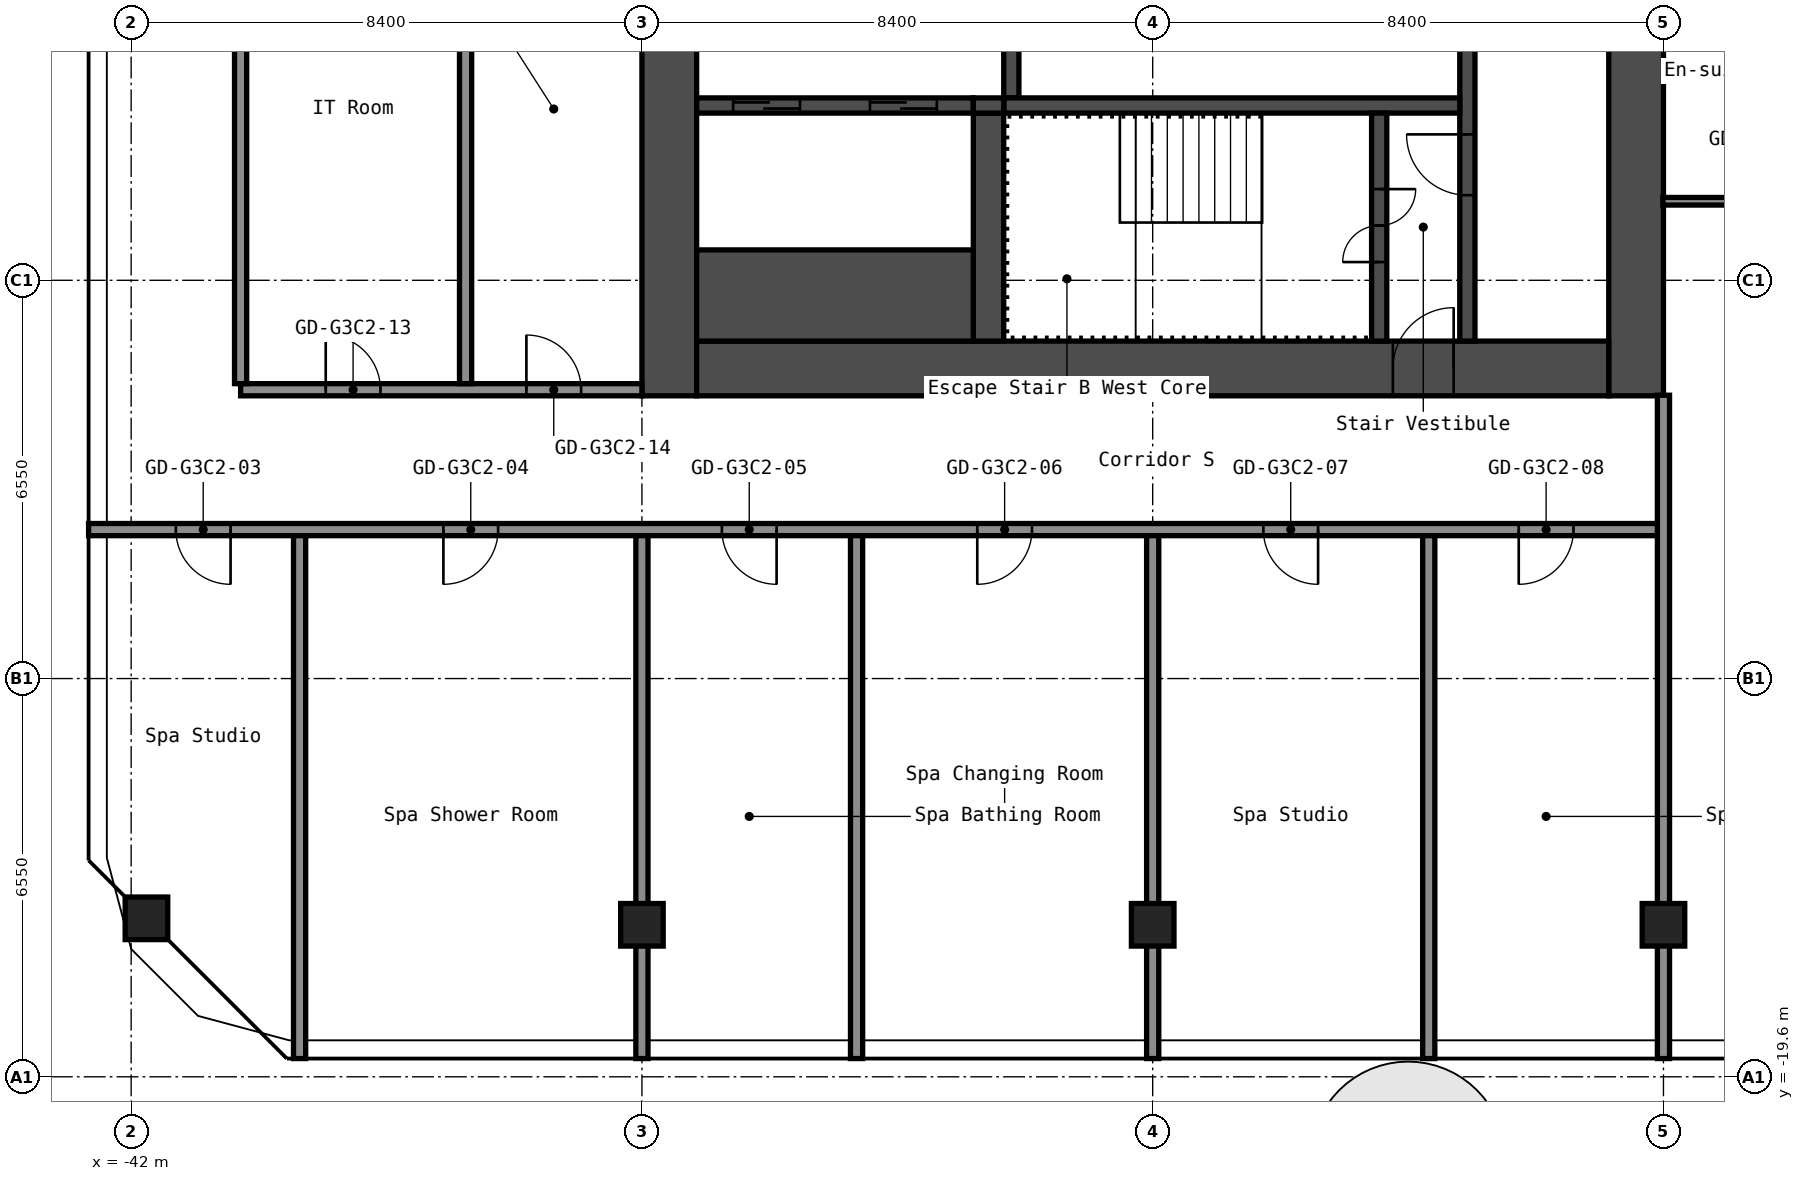
"""IFC4 building model, lengths in metres.
Left out: names, types, materials, properties, quantities, classifications, styles, units other than length and angle.
Written with IfcOpenShell. Run it as: python <this file> out.ifc"""

import sys

from ifc_helpers import new_model, si_unit, direction, frame, frame_2d, origin, origin_2d, place, context, subcontext, project, spatial, rectangle, hollow_rectangle, extrude, element, fill, save


model = new_model("IFC4")
c1 = context("Model", 3, precision=1e-05, world=origin(), true_north=direction((0.0, 1.0)))
c2 = subcontext(c1, "Body", "Model", "MODEL_VIEW")
j1 = project(units=[si_unit("LENGTHUNIT", "METRE"), si_unit("PLANEANGLEUNIT", "RADIAN")], contexts=[c1])
p1 = place(None, origin())
s1 = spatial("IfcSite", under=j1, at=p1, CompositionType="ELEMENT")
p2 = place(p1, origin())
s2 = spatial("IfcBuilding", under=s1, at=p2, CompositionType="ELEMENT")
p3 = place(p2, frame((0.0, 0.0, 169.4)))
s3 = spatial("IfcBuildingStorey", under=s2, at=p3, CompositionType="ELEMENT", Elevation=169.4)
for number, where, z_axis, x_axis in (
    (1, (-41.749, -16.994, 0.0), (0.0, 0.0, 1.0), (1.0, 0.0, 0.0)),
    (2, (-33.6, -17.1, 0.0), (0.0, 0.0, 1.0), (1.0, 0.0, 0.0)),
    (3, (-25.2, -17.1, 0.0), (0.0, 0.0, 1.0), (1.0, 0.0, 0.0)),
    (4, (-16.8, -17.1, 0.0), (0.0, 0.0, 1.0), (1.0, 0.0, 0.0)),
):
    element("IfcColumn", number, at=place(p3, frame(where, z_axis=z_axis, x_axis=x_axis)), inside=s3, PredefinedType="COLUMN", context=c2, shape_type="SweptSolid", body=[
        extrude(hollow_rectangle(XDim=0.7, YDim=0.7, WallThickness=0.028, at=origin_2d()), origin(), (0.0, 0.0, 1.0), 2.75),
    ])
p4 = place(p3, frame((-17.25, -8.4, 0.0), z_axis=(0.0, 0.0, 1.0), x_axis=(0.0, 1.0, 0.0)))
e5 = element("IfcWall", 5, at=p4, inside=s3, PredefinedType="SHEAR", context=c2, shape_type="SweptSolid", body=[
    extrude(rectangle(XDim=16.8, YDim=0.9, at=frame_2d((8.4, 0.0))), origin(), (0.0, 0.0, 1.0), 2.75),
])
p5 = place(p4, frame((7.1, 0.0, 0.0)))
e6 = element("IfcOpeningElement", 6, at=p5, cuts=e5, PredefinedType="OPENING", context=c2, shape_type="SweptSolid", body=[
    extrude(rectangle(XDim=1.6, YDim=2.1, at=frame_2d((0.8, 1.05))), frame((0.0, 0.46, 0.0), z_axis=(0.0, -1.0, 0.0), x_axis=(1.0, 0.0, 0.0)), (0.0, 0.0, 1.0), 0.92),
])
p6 = place(p3, frame((-33.15, -8.4, 0.0), z_axis=(0.0, 0.0, 1.0), x_axis=(0.0, 1.0, 0.0)))
e7 = element("IfcWall", 7, at=p6, inside=s3, PredefinedType="SHEAR", context=c2, shape_type="SweptSolid", body=[
    extrude(rectangle(XDim=16.8, YDim=0.9, at=frame_2d((8.4, 0.0))), origin(), (0.0, 0.0, 1.0), 2.75),
])
p7 = place(p3, frame((-32.7, -7.95, 0.0), z_axis=(0.0, 0.0, 1.0), x_axis=(1.0, 0.0, 0.0)))
e8 = element("IfcWall", 8, at=p7, inside=s3, PredefinedType="SHEAR", context=c2, shape_type="SweptSolid", body=[
    extrude(rectangle(XDim=15.0, YDim=0.9, at=frame_2d((7.5, 0.0))), origin(), (0.0, 0.0, 1.0), 2.75),
])
p8 = place(p7, frame((11.45, 0.0, 0.0)))
e9 = element("IfcOpeningElement", 9, at=p8, cuts=e8, PredefinedType="OPENING", context=c2, shape_type="SweptSolid", body=[
    extrude(rectangle(XDim=1.0, YDim=2.1, at=frame_2d((0.5, 1.05))), frame((0.0, 0.46, 0.0), z_axis=(0.0, -1.0, 0.0), x_axis=(1.0, 0.0, 0.0)), (0.0, 0.0, 1.0), 0.92),
])
p9 = place(p3, frame((-20.025, -7.5, 0.0), z_axis=(0.0, 0.0, 1.0), x_axis=(0.0, 1.0, 0.0)))
e10 = element("IfcWall", 10, at=p9, inside=s3, PredefinedType="SHEAR", context=c2, shape_type="SweptSolid", body=[
    extrude(rectangle(XDim=6.3, YDim=0.25, at=frame_2d((3.15, 0.0))), origin(), (0.0, 0.0, 1.0), 2.75),
])
p10 = place(p9, frame((2.4, 0.0, 0.0)))
e11 = element("IfcOpeningElement", 11, at=p10, cuts=e10, PredefinedType="OPENING", context=c2, shape_type="SweptSolid", body=[
    extrude(rectangle(XDim=1.0, YDim=2.1, at=frame_2d((0.5, 1.05))), frame((0.0, 0.135, 0.0), z_axis=(0.0, -1.0, 0.0), x_axis=(1.0, 0.0, 0.0)), (0.0, 0.0, 1.0), 0.27),
])
p11 = place(p3, frame((-27.525, -3.5, 0.0), z_axis=(0.0, 0.0, 1.0), x_axis=(0.0, 1.0, 0.0)))
e12 = element("IfcWall", 12, at=p11, inside=s3, PredefinedType="SHEAR", context=c2, shape_type="SweptSolid", body=[
    extrude(rectangle(XDim=2.05, YDim=0.25, at=frame_2d((1.025, 0.0))), origin(), (0.0, 0.0, 1.0), 2.75),
])
p12 = place(p3, frame((-27.65, -3.625, 0.0), z_axis=(0.0, 0.0, 1.0), x_axis=(1.0, 0.0, 0.0)))
e13 = element("IfcWall", 13, at=p12, inside=s3, PredefinedType="SHEAR", context=c2, shape_type="SweptSolid", body=[
    extrude(rectangle(XDim=7.5, YDim=0.25, at=frame_2d((3.75, 0.0))), origin(), (0.0, 0.0, 1.0), 2.75),
])
p13 = place(p3, frame((-21.475, -7.5, 0.0), z_axis=(0.0, 0.0, 1.0), x_axis=(0.0, 1.0, 0.0)))
e14 = element("IfcWall", 14, at=p13, inside=s3, PredefinedType="SHEAR", context=c2, shape_type="SweptSolid", body=[
    extrude(rectangle(XDim=3.75, YDim=0.25, at=frame_2d((1.875, 0.0))), origin(), (0.0, 0.0, 1.0), 2.75),
])
p14 = place(p13, frame((1.3, 0.0, 0.0)))
e15 = element("IfcOpeningElement", 15, at=p14, cuts=e14, PredefinedType="OPENING", context=c2, shape_type="SweptSolid", body=[
    extrude(rectangle(XDim=1.2, YDim=2.1, at=frame_2d((0.6, 1.05))), frame((0.0, 0.135, 0.0), z_axis=(0.0, -1.0, 0.0), x_axis=(1.0, 0.0, 0.0)), (0.0, 0.0, 1.0), 0.27),
])
p15 = place(p3, frame((-27.9, -7.5, 0.0), z_axis=(0.0, 0.0, 1.0), x_axis=(0.0, 1.0, 0.0)))
e16 = element("IfcWall", 16, at=p15, inside=s3, PredefinedType="SHEAR", context=c2, shape_type="SweptSolid", body=[
    extrude(rectangle(XDim=3.75, YDim=0.5, at=frame_2d((1.875, 0.0))), origin(), (0.0, 0.0, 1.0), 2.75),
])
p16 = place(p3, frame((-32.7, -3.625, 0.0), z_axis=(0.0, 0.0, 1.0), x_axis=(1.0, 0.0, 0.0)))
e17 = element("IfcWall", 17, at=p16, inside=s3, PredefinedType="SHEAR", context=c2, shape_type="SweptSolid", body=[
    extrude(rectangle(XDim=4.55, YDim=0.25, at=frame_2d((2.275, 0.0))), origin(), (0.0, 0.0, 1.0), 2.75),
])
p17 = place(p16, frame((2.85, 0.0, 0.0)))
e18 = element("IfcOpeningElement", 18, at=p17, cuts=e17, PredefinedType="OPENING", context=c2, shape_type="SweptSolid", body=[
    extrude(rectangle(XDim=1.1, YDim=2.1, at=frame_2d((0.55, 1.05))), frame((0.0, 0.135, 0.0), z_axis=(0.0, -1.0, 0.0), x_axis=(1.0, 0.0, 0.0)), (0.0, 0.0, 1.0), 0.27),
])
p18 = place(p16, frame((0.6, 0.0, 0.0)))
e19 = element("IfcOpeningElement", 19, at=p18, cuts=e17, PredefinedType="OPENING", context=c2, shape_type="SweptSolid", body=[
    extrude(rectangle(XDim=1.1, YDim=2.1, at=frame_2d((0.55, 1.05))), frame((0.0, 0.135, 0.0), z_axis=(0.0, -1.0, 0.0), x_axis=(1.0, 0.0, 0.0)), (0.0, 0.0, 1.0), 0.27),
])
p19 = place(p3, frame((-32.7, -6.75, 0.0), z_axis=(0.0, 0.0, 1.0), x_axis=(1.0, 0.0, 0.0)))
e20 = element("IfcWall", 20, at=p19, inside=s3, PredefinedType="SHEAR", context=c2, shape_type="SweptSolid", body=[
    extrude(rectangle(XDim=4.55, YDim=1.5, at=frame_2d((2.275, 0.0))), origin(), (0.0, 0.0, 1.0), 2.75),
])
p20 = place(p3, frame((-28.15, -3.625, 0.0), z_axis=(0.0, 0.0, 1.0), x_axis=(1.0, 0.0, 0.0)))
e21 = element("IfcWall", 21, at=p20, inside=s3, PredefinedType="SHEAR", context=c2, shape_type="SweptSolid", body=[
    extrude(rectangle(XDim=0.5, YDim=0.25, at=frame_2d((0.25, 0.0))), origin(), (0.0, 0.0, 1.0), 2.75),
])
p21 = place(p3, frame((-42.7, -10.6, 0.0), z_axis=(0.0, 0.0, 1.0), x_axis=(1.0, 0.0, 0.0)))
e22 = element("IfcWall", 22, at=p21, inside=s3, PredefinedType="PARTITIONING", context=c2, shape_type="SweptSolid", body=[
    extrude(rectangle(XDim=25.9, YDim=0.2, at=frame_2d((12.95, 0.0))), origin(), (0.0, 0.0, 1.0), 2.75),
])
p22 = place(p21, frame((1.435, 0.0, 0.0)))
e23 = element("IfcOpeningElement", 23, at=p22, cuts=e22, PredefinedType="OPENING", context=c2, shape_type="SweptSolid", body=[
    extrude(rectangle(XDim=0.9, YDim=2.1, at=frame_2d((0.45, 1.05))), frame((0.0, 0.11, 0.0), z_axis=(0.0, -1.0, 0.0), x_axis=(1.0, 0.0, 0.0)), (0.0, 0.0, 1.0), 0.22),
])
p23 = place(p21, frame((5.835, 0.0, 0.0)))
e24 = element("IfcOpeningElement", 24, at=p23, cuts=e22, PredefinedType="OPENING", context=c2, shape_type="SweptSolid", body=[
    extrude(rectangle(XDim=0.9, YDim=2.1, at=frame_2d((0.45, 1.05))), frame((0.0, 0.11, 0.0), z_axis=(0.0, -1.0, 0.0), x_axis=(1.0, 0.0, 0.0)), (0.0, 0.0, 1.0), 0.22),
])
p24 = place(p21, frame((10.415, 0.0, 0.0)))
e25 = element("IfcOpeningElement", 25, at=p24, cuts=e22, PredefinedType="OPENING", context=c2, shape_type="SweptSolid", body=[
    extrude(rectangle(XDim=0.9, YDim=2.1, at=frame_2d((0.45, 1.05))), frame((0.0, 0.11, 0.0), z_axis=(0.0, -1.0, 0.0), x_axis=(1.0, 0.0, 0.0)), (0.0, 0.0, 1.0), 0.22),
])
p25 = place(p21, frame((14.615, 0.0, 0.0)))
e26 = element("IfcOpeningElement", 26, at=p25, cuts=e22, PredefinedType="OPENING", context=c2, shape_type="SweptSolid", body=[
    extrude(rectangle(XDim=0.9, YDim=2.1, at=frame_2d((0.45, 1.05))), frame((0.0, 0.11, 0.0), z_axis=(0.0, -1.0, 0.0), x_axis=(1.0, 0.0, 0.0)), (0.0, 0.0, 1.0), 0.22),
])
p26 = place(p21, frame((19.32, 0.0, 0.0)))
e27 = element("IfcOpeningElement", 27, at=p26, cuts=e22, PredefinedType="OPENING", context=c2, shape_type="SweptSolid", body=[
    extrude(rectangle(XDim=0.9, YDim=2.1, at=frame_2d((0.45, 1.05))), frame((0.0, 0.11, 0.0), z_axis=(0.0, -1.0, 0.0), x_axis=(1.0, 0.0, 0.0)), (0.0, 0.0, 1.0), 0.22),
])
p27 = place(p21, frame((23.52, 0.0, 0.0)))
e28 = element("IfcOpeningElement", 28, at=p27, cuts=e22, PredefinedType="OPENING", context=c2, shape_type="SweptSolid", body=[
    extrude(rectangle(XDim=0.9, YDim=2.1, at=frame_2d((0.45, 1.05))), frame((0.0, 0.11, 0.0), z_axis=(0.0, -1.0, 0.0), x_axis=(1.0, 0.0, 0.0)), (0.0, 0.0, 1.0), 0.22),
])
p28 = place(p3, frame((-40.2, -8.3, 0.0), z_axis=(0.0, 0.0, 1.0), x_axis=(1.0, 0.0, 0.0)))
e29 = element("IfcWall", 29, at=p28, inside=s3, PredefinedType="PARTITIONING", context=c2, shape_type="SweptSolid", body=[
    extrude(rectangle(XDim=6.6, YDim=0.2, at=frame_2d((3.3, 0.0))), origin(), (0.0, 0.0, 1.0), 2.75),
])
p29 = place(p28, frame((1.4, 0.0, 0.0)))
e30 = element("IfcOpeningElement", 30, at=p29, cuts=e29, PredefinedType="OPENING", context=c2, shape_type="SweptSolid", body=[
    extrude(rectangle(XDim=0.9, YDim=2.1, at=frame_2d((0.45, 1.05))), frame((0.0, 0.11, 0.0), z_axis=(0.0, -1.0, 0.0), x_axis=(1.0, 0.0, 0.0)), (0.0, 0.0, 1.0), 0.22),
])
p30 = place(p28, frame((4.7, 0.0, 0.0)))
e31 = element("IfcOpeningElement", 31, at=p30, cuts=e29, PredefinedType="OPENING", context=c2, shape_type="SweptSolid", body=[
    extrude(rectangle(XDim=0.9, YDim=2.1, at=frame_2d((0.45, 1.05))), frame((0.0, 0.11, 0.0), z_axis=(0.0, -1.0, 0.0), x_axis=(1.0, 0.0, 0.0)), (0.0, 0.0, 1.0), 0.22),
])
p31 = place(p3, frame((-16.81, -5.2, 0.0), z_axis=(0.0, 0.0, 1.0), x_axis=(1.0, 0.0, 0.0)))
e32 = element("IfcWall", 32, at=p31, inside=s3, PredefinedType="PARTITIONING", context=c2, shape_type="SweptSolid", body=[
    extrude(rectangle(XDim=3.348, YDim=0.125, at=frame_2d((1.674, 0.0))), origin(), (0.0, 0.0, 1.0), 2.75),
])
p32 = place(p31, frame((1.31, 0.0, 0.0)))
e33 = element("IfcOpeningElement", 33, at=p32, cuts=e32, PredefinedType="OPENING", context=c2, shape_type="SweptSolid", body=[
    extrude(rectangle(XDim=0.8, YDim=2.1, at=frame_2d((0.4, 1.05))), frame((0.0, 0.073, 0.0), z_axis=(0.0, -1.0, 0.0), x_axis=(1.0, 0.0, 0.0)), (0.0, 0.0, 1.0), 0.145),
])
p33 = place(p3, frame((-40.2, -8.2, 0.0), z_axis=(0.0, 0.0, 1.0), x_axis=(0.0, 1.0, 0.0)))
e34 = element("IfcWall", 34, at=p33, inside=s3, PredefinedType="PARTITIONING", context=c2, shape_type="SweptSolid", body=[
    extrude(rectangle(XDim=16.4, YDim=0.2, at=frame_2d((8.2, 0.0))), origin(), (0.0, 0.0, 1.0), 2.75),
])
p34 = place(p3, frame((-39.23, -19.3, 0.0), z_axis=(0.0, 0.0, 1.0), x_axis=(0.0, 1.0, 0.0)))
e35 = element("IfcWall", 35, at=p34, inside=s3, PredefinedType="PARTITIONING", context=c2, shape_type="SweptSolid", body=[
    extrude(rectangle(XDim=8.6, YDim=0.2, at=frame_2d((4.3, 0.0))), origin(), (0.0, 0.0, 1.0), 2.75),
])
p35 = place(p3, frame((-36.5, -8.2, 0.0), z_axis=(0.0, 0.0, 1.0), x_axis=(0.0, 1.0, 0.0)))
e36 = element("IfcWall", 36, at=p35, inside=s3, PredefinedType="PARTITIONING", context=c2, shape_type="SweptSolid", body=[
    extrude(rectangle(XDim=8.2, YDim=0.2, at=frame_2d((4.1, 0.0))), origin(), (0.0, 0.0, 1.0), 2.75),
])
for number, where, z_axis, x_axis in (
    (37, (-33.6, -19.3, 0.0), (0.0, 0.0, 1.0), (0.0, 1.0, 0.0)),
    (38, (-30.07, -19.3, 0.0), (0.0, 0.0, 1.0), (0.0, 1.0, 0.0)),
    (39, (-25.2, -19.3, 0.0), (0.0, 0.0, 1.0), (0.0, 1.0, 0.0)),
    (40, (-20.66, -19.3, 0.0), (0.0, 0.0, 1.0), (0.0, 1.0, 0.0)),
):
    element("IfcWall", number, at=place(p3, frame(where, z_axis=z_axis, x_axis=x_axis)), inside=s3, PredefinedType="PARTITIONING", context=c2, shape_type="SweptSolid", body=[
        extrude(rectangle(XDim=8.6, YDim=0.2, at=frame_2d((4.3, 0.0))), origin(), (0.0, 0.0, 1.0), 2.75),
    ])
p36 = place(p3, frame((-16.8, -19.3, 0.0), z_axis=(0.0, 0.0, 1.0), x_axis=(0.0, 1.0, 0.0)))
e41 = element("IfcWall", 41, at=p36, inside=s3, PredefinedType="PARTITIONING", context=c2, shape_type="SweptSolid", body=[
    extrude(rectangle(XDim=10.91, YDim=0.2, at=frame_2d((5.455, 0.0))), origin(), (0.0, 0.0, 1.0), 2.75),
])
p37 = place(p8, origin())
e42 = element("IfcDoor", 42, at=p37, inside=s3, OperationType="SINGLE_SWING_LEFT", PredefinedType="DOOR", context=c2, shape_type="SweptSolid", body=[
    extrude(rectangle(XDim=1.0, YDim=2.1, at=frame_2d((0.5, 1.05))), frame((0.0, 0.025, 0.0), z_axis=(0.0, -1.0, 0.0), x_axis=(1.0, 0.0, 0.0)), (0.0, 0.0, 1.0), 0.05),
])
fill(e9, e42)
p38 = place(p14, origin())
e43 = element("IfcDoor", 43, at=p38, inside=s3, OperationType="DOUBLE_DOOR_SINGLE_SWING", PredefinedType="DOOR", context=c2, shape_type="SweptSolid", body=[
    extrude(rectangle(XDim=1.2, YDim=2.1, at=frame_2d((0.6, 1.05))), frame((0.0, 0.025, 0.0), z_axis=(0.0, -1.0, 0.0), x_axis=(1.0, 0.0, 0.0)), (0.0, 0.0, 1.0), 0.05),
])
fill(e15, e43)
p39 = place(p10, origin())
e44 = element("IfcDoor", 44, at=p39, inside=s3, OperationType="SINGLE_SWING_LEFT", PredefinedType="DOOR", context=c2, shape_type="SweptSolid", body=[
    extrude(rectangle(XDim=1.0, YDim=2.1, at=frame_2d((0.5, 1.05))), frame((0.0, 0.025, 0.0), z_axis=(0.0, -1.0, 0.0), x_axis=(1.0, 0.0, 0.0)), (0.0, 0.0, 1.0), 0.05),
])
fill(e11, e44)
p40 = place(p17, origin())
e45 = element("IfcDoor", 45, at=p40, inside=s3, OperationType="DOUBLE_DOOR_SLIDING", PredefinedType="DOOR", context=c2, shape_type="SweptSolid", body=[
    extrude(rectangle(XDim=1.1, YDim=2.1, at=frame_2d((0.55, 1.05))), frame((0.0, 0.025, 0.0), z_axis=(0.0, -1.0, 0.0), x_axis=(1.0, 0.0, 0.0)), (0.0, 0.0, 1.0), 0.05),
])
fill(e18, e45)
p41 = place(p18, origin())
e46 = element("IfcDoor", 46, at=p41, inside=s3, OperationType="DOUBLE_DOOR_SLIDING", PredefinedType="DOOR", context=c2, shape_type="SweptSolid", body=[
    extrude(rectangle(XDim=1.1, YDim=2.1, at=frame_2d((0.55, 1.05))), frame((0.0, 0.025, 0.0), z_axis=(0.0, -1.0, 0.0), x_axis=(1.0, 0.0, 0.0)), (0.0, 0.0, 1.0), 0.05),
])
fill(e19, e46)
p42 = place(p22, origin())
e47 = element("IfcDoor", 47, at=p42, inside=s3, OperationType="SINGLE_SWING_RIGHT", PredefinedType="DOOR", context=c2, shape_type="SweptSolid", body=[
    extrude(rectangle(XDim=0.9, YDim=2.1, at=frame_2d((0.45, 1.05))), frame((0.0, 0.025, 0.0), z_axis=(0.0, -1.0, 0.0), x_axis=(1.0, 0.0, 0.0)), (0.0, 0.0, 1.0), 0.05),
])
fill(e23, e47)
p43 = place(p23, origin())
e48 = element("IfcDoor", 48, at=p43, inside=s3, OperationType="SINGLE_SWING_LEFT", PredefinedType="DOOR", context=c2, shape_type="SweptSolid", body=[
    extrude(rectangle(XDim=0.9, YDim=2.1, at=frame_2d((0.45, 1.05))), frame((0.0, 0.025, 0.0), z_axis=(0.0, -1.0, 0.0), x_axis=(1.0, 0.0, 0.0)), (0.0, 0.0, 1.0), 0.05),
])
fill(e24, e48)
p44 = place(p24, origin())
e49 = element("IfcDoor", 49, at=p44, inside=s3, OperationType="SINGLE_SWING_RIGHT", PredefinedType="DOOR", context=c2, shape_type="SweptSolid", body=[
    extrude(rectangle(XDim=0.9, YDim=2.1, at=frame_2d((0.45, 1.05))), frame((0.0, 0.025, 0.0), z_axis=(0.0, -1.0, 0.0), x_axis=(1.0, 0.0, 0.0)), (0.0, 0.0, 1.0), 0.05),
])
fill(e25, e49)
p45 = place(p25, origin())
e50 = element("IfcDoor", 50, at=p45, inside=s3, OperationType="SINGLE_SWING_LEFT", PredefinedType="DOOR", context=c2, shape_type="SweptSolid", body=[
    extrude(rectangle(XDim=0.9, YDim=2.1, at=frame_2d((0.45, 1.05))), frame((0.0, 0.025, 0.0), z_axis=(0.0, -1.0, 0.0), x_axis=(1.0, 0.0, 0.0)), (0.0, 0.0, 1.0), 0.05),
])
fill(e26, e50)
p46 = place(p26, origin())
e51 = element("IfcDoor", 51, at=p46, inside=s3, OperationType="SINGLE_SWING_RIGHT", PredefinedType="DOOR", context=c2, shape_type="SweptSolid", body=[
    extrude(rectangle(XDim=0.9, YDim=2.1, at=frame_2d((0.45, 1.05))), frame((0.0, 0.025, 0.0), z_axis=(0.0, -1.0, 0.0), x_axis=(1.0, 0.0, 0.0)), (0.0, 0.0, 1.0), 0.05),
])
fill(e27, e51)
p47 = place(p27, origin())
e52 = element("IfcDoor", 52, at=p47, inside=s3, OperationType="SINGLE_SWING_LEFT", PredefinedType="DOOR", context=c2, shape_type="SweptSolid", body=[
    extrude(rectangle(XDim=0.9, YDim=2.1, at=frame_2d((0.45, 1.05))), frame((0.0, 0.025, 0.0), z_axis=(0.0, -1.0, 0.0), x_axis=(1.0, 0.0, 0.0)), (0.0, 0.0, 1.0), 0.05),
])
fill(e28, e52)
p48 = place(p29, origin())
e53 = element("IfcDoor", 53, at=p48, inside=s3, OperationType="SINGLE_SWING_RIGHT", PredefinedType="DOOR", context=c2, shape_type="SweptSolid", body=[
    extrude(rectangle(XDim=0.9, YDim=2.1, at=frame_2d((0.45, 1.05))), frame((0.0, 0.025, 0.0), z_axis=(0.0, -1.0, 0.0), x_axis=(1.0, 0.0, 0.0)), (0.0, 0.0, 1.0), 0.05),
])
fill(e30, e53)
p49 = place(p30, origin())
e54 = element("IfcDoor", 54, at=p49, inside=s3, OperationType="SINGLE_SWING_RIGHT", PredefinedType="DOOR", context=c2, shape_type="SweptSolid", body=[
    extrude(rectangle(XDim=0.9, YDim=2.1, at=frame_2d((0.45, 1.05))), frame((0.0, 0.025, 0.0), z_axis=(0.0, -1.0, 0.0), x_axis=(1.0, 0.0, 0.0)), (0.0, 0.0, 1.0), 0.05),
])
fill(e31, e54)
save(model, sys.argv[1])
